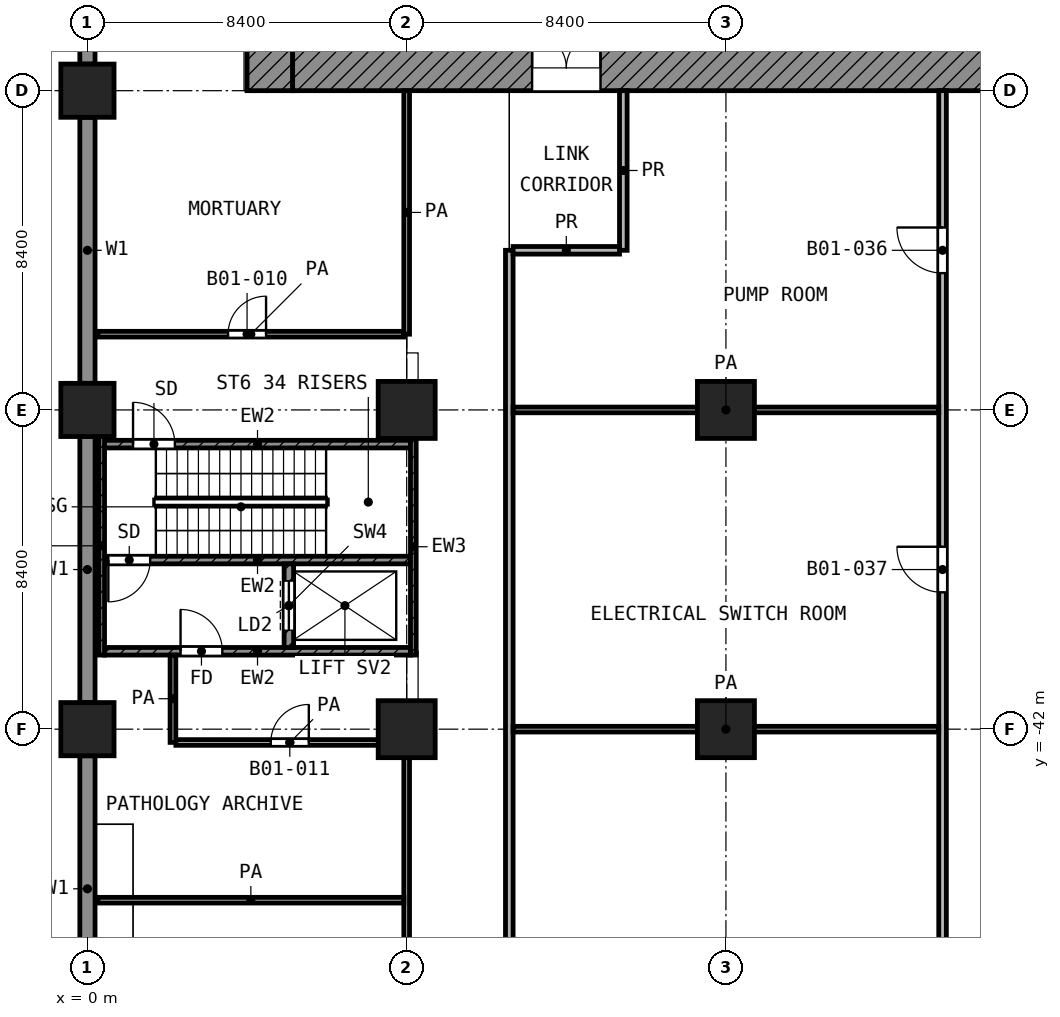
"""IFC4 building model, lengths in metres.
Left out: names, types, materials, properties, quantities, classifications, styles, units other than length and angle.
Written with IfcOpenShell. Run it as: python <this file> out.ifc"""

import sys

from ifc_helpers import new_model, si_unit, direction, frame, frame_2d, origin, origin_2d, place, context, subcontext, project, spatial, polyline, rectangle, outline, extrude, element, fill, save


model = new_model("IFC4")
c1 = context("Model", 3, precision=1e-05, world=origin(), true_north=direction((0.0, 1.0)))
c2 = subcontext(c1, "Body", "Model", "MODEL_VIEW")
j1 = project(units=[si_unit("LENGTHUNIT", "METRE"), si_unit("PLANEANGLEUNIT", "RADIAN")], contexts=[c1])
p1 = place(None, origin())
s1 = spatial("IfcSite", under=j1, at=p1, CompositionType="ELEMENT")
p2 = place(p1, origin())
s2 = spatial("IfcBuilding", under=s1, at=p2, CompositionType="ELEMENT")
p3 = place(p2, frame((0.0, 0.0, -6.0)))
s3 = spatial("IfcBuildingStorey", under=s2, at=p3, CompositionType="ELEMENT", Elevation=-6.0)
p4 = place(p3, origin())
e1 = element("IfcWall", 1, at=p4, inside=s3, PredefinedType="SOLIDWALL", context=c2, shape_type="SweptSolid", body=[
    extrude(outline(polyline([(0.2, -17.5), (0.2, -24.5), (-0.2, -24.5), (-0.2, -17.5), (0.2, -17.5)])), origin(), (0.0, 0.0, 1.0), 5.55),
])
e2 = element("IfcWall", 2, at=p4, inside=s3, PredefinedType="SOLIDWALL", context=c2, shape_type="SweptSolid", body=[
    extrude(outline(polyline([(0.2, -25.9), (0.2, -32.9), (-0.2, -32.9), (-0.2, -25.9), (0.2, -25.9)])), origin(), (0.0, 0.0, 1.0), 5.55),
])
e3 = element("IfcWall", 3, at=p4, inside=s3, PredefinedType="SOLIDWALL", context=c2, shape_type="SweptSolid", body=[
    extrude(outline(polyline([(0.2, -34.3), (0.2, -41.3), (-0.2, -41.3), (-0.2, -34.3), (0.2, -34.3)])), origin(), (0.0, 0.0, 1.0), 5.55),
])
e4 = element("IfcWall", 4, at=p4, inside=s3, PredefinedType="SOLIDWALL", context=c2, shape_type="SweptSolid", body=[
    extrude(outline(polyline([(0.2, -42.7), (0.2, -49.7), (-0.2, -49.7), (-0.2, -42.7), (0.2, -42.7)])), origin(), (0.0, 0.0, 1.0), 5.55),
])
for number, where, z_axis, x_axis in (
    (5, (0.0, -25.2, 0.0), (0.0, 0.0, 1.0), (1.0, 0.0, 0.0)),
    (6, (0.0, -33.6, 0.0), (0.0, 0.0, 1.0), (1.0, 0.0, 0.0)),
):
    element("IfcColumn", number, at=place(p3, frame(where, z_axis=z_axis, x_axis=x_axis)), inside=s3, PredefinedType="COLUMN", context=c2, shape_type="SweptSolid", body=[
        extrude(rectangle(XDim=1.4, YDim=1.4, at=origin_2d()), origin(), (0.0, 0.0, 1.0), 6.0),
    ])
for number, where, z_axis, x_axis in (
    (7, (8.4, -33.6, 0.0), (0.0, 0.0, 1.0), (1.0, 0.0, 0.0)),
    (8, (16.8, -33.6, 0.0), (0.0, 0.0, 1.0), (1.0, 0.0, 0.0)),
):
    element("IfcColumn", number, at=place(p3, frame(where, z_axis=z_axis, x_axis=x_axis)), inside=s3, PredefinedType="COLUMN", context=c2, shape_type="SweptSolid", body=[
        extrude(rectangle(XDim=1.5, YDim=1.5, at=origin_2d()), origin(), (0.0, 0.0, 1.0), 6.0),
    ])
p5 = place(p3, frame((0.0, -42.0, 0.0), z_axis=(0.0, 0.0, 1.0), x_axis=(1.0, 0.0, 0.0)))
e9 = element("IfcColumn", 9, at=p5, inside=s3, PredefinedType="COLUMN", context=c2, shape_type="SweptSolid", body=[
    extrude(rectangle(XDim=1.4, YDim=1.4, at=origin_2d()), origin(), (0.0, 0.0, 1.0), 6.0),
])
for number, where, z_axis, x_axis in (
    (10, (8.4, -42.0, 0.0), (0.0, 0.0, 1.0), (1.0, 0.0, 0.0)),
    (11, (16.8, -42.0, 0.0), (0.0, 0.0, 1.0), (1.0, 0.0, 0.0)),
):
    element("IfcColumn", number, at=place(p3, frame(where, z_axis=z_axis, x_axis=x_axis)), inside=s3, PredefinedType="COLUMN", context=c2, shape_type="SweptSolid", body=[
        extrude(rectangle(XDim=1.5, YDim=1.5, at=origin_2d()), origin(), (0.0, 0.0, 1.0), 6.0),
    ])
p6 = place(p3, frame((4.8, -25.2, 0.0), z_axis=(0.0, 0.0, 1.0), x_axis=(0.0, 1.0, 0.0)))
e12 = element("IfcWall", 12, at=p6, inside=s3, PredefinedType="SHEAR", context=c2, shape_type="SweptSolid", body=[
    extrude(rectangle(XDim=19.8, YDim=1.2, at=frame_2d((9.9, 0.0))), origin(), (0.0, 0.0, 1.0), 5.55),
])
p7 = place(p6, frame((11.65, 0.0, 0.0)))
e13 = element("IfcOpeningElement", 13, at=p7, cuts=e12, PredefinedType="OPENING", context=c2, shape_type="SweptSolid", body=[
    extrude(rectangle(XDim=1.1, YDim=2.1, at=frame_2d((0.55, 1.05))), frame((0.0, 0.61, 0.0), z_axis=(0.0, -1.0, 0.0), x_axis=(1.0, 0.0, 0.0)), (0.0, 0.0, 1.0), 1.22),
])
p8 = place(p6, frame((2.35, 0.0, 0.0)))
e14 = element("IfcOpeningElement", 14, at=p8, cuts=e12, PredefinedType="OPENING", context=c2, shape_type="SweptSolid", body=[
    extrude(rectangle(XDim=1.1, YDim=2.1, at=frame_2d((0.55, 1.05))), frame((0.0, 0.61, 0.0), z_axis=(0.0, -1.0, 0.0), x_axis=(1.0, 0.0, 0.0)), (0.0, 0.0, 1.0), 1.22),
])
p9 = place(p3, frame((5.4, -24.6, 0.0), z_axis=(0.0, 0.0, 1.0), x_axis=(1.0, 0.0, 0.0)))
e15 = element("IfcWall", 15, at=p9, inside=s3, PredefinedType="SHEAR", context=c2, shape_type="SweptSolid", body=[
    extrude(rectangle(XDim=18.6, YDim=1.2, at=frame_2d((9.3, 0.0))), origin(), (0.0, 0.0, 1.0), 5.55),
])
p10 = place(p9, frame((6.3, 0.0, 0.0)))
e16 = element("IfcOpeningElement", 16, at=p10, cuts=e15, PredefinedType="OPENING", context=c2, shape_type="SweptSolid", body=[
    extrude(rectangle(XDim=1.8, YDim=2.1, at=frame_2d((0.9, 1.05))), frame((0.0, 0.61, 0.0), z_axis=(0.0, -1.0, 0.0), x_axis=(1.0, 0.0, 0.0)), (0.0, 0.0, 1.0), 1.22),
])
p11 = place(p3, frame((0.375, -40.05, 0.0), z_axis=(0.0, 0.0, 1.0), x_axis=(0.0, 1.0, 0.0)))
e17 = element("IfcWall", 17, at=p11, inside=s3, PredefinedType="SHEAR", context=c2, shape_type="SweptSolid", body=[
    extrude(rectangle(XDim=5.75, YDim=0.15, at=frame_2d((2.875, 0.0))), origin(), (0.0, 0.0, 1.0), 5.55),
])
p12 = place(p3, frame((8.575, -40.05, 0.0), z_axis=(0.0, 0.0, 1.0), x_axis=(0.0, 1.0, 0.0)))
e18 = element("IfcWall", 18, at=p12, inside=s3, PredefinedType="SHEAR", context=c2, shape_type="SweptSolid", body=[
    extrude(rectangle(XDim=5.7, YDim=0.15, at=frame_2d((2.85, 0.0))), origin(), (0.0, 0.0, 1.0), 5.55),
])
p13 = place(p3, frame((0.45, -34.5, 0.0), z_axis=(0.0, 0.0, 1.0), x_axis=(1.0, 0.0, 0.0)))
e19 = element("IfcWall", 19, at=p13, inside=s3, PredefinedType="SHEAR", context=c2, shape_type="SweptSolid", body=[
    extrude(rectangle(XDim=8.05, YDim=0.2, at=frame_2d((4.025, 0.0))), origin(), (0.0, 0.0, 1.0), 5.55),
])
p14 = place(p13, frame((0.75, 0.0, 0.0)))
e20 = element("IfcOpeningElement", 20, at=p14, cuts=e19, PredefinedType="OPENING", context=c2, shape_type="SweptSolid", body=[
    extrude(rectangle(XDim=1.1, YDim=2.1, at=frame_2d((0.55, 1.05))), frame((0.0, 0.11, 0.0), z_axis=(0.0, -1.0, 0.0), x_axis=(1.0, 0.0, 0.0)), (0.0, 0.0, 1.0), 0.22),
])
p15 = place(p3, frame((0.45, -37.55, 0.0), z_axis=(0.0, 0.0, 1.0), x_axis=(1.0, 0.0, 0.0)))
e21 = element("IfcWall", 21, at=p15, inside=s3, PredefinedType="SHEAR", context=c2, shape_type="SweptSolid", body=[
    extrude(rectangle(XDim=8.05, YDim=0.2, at=frame_2d((4.025, 0.0))), origin(), (0.0, 0.0, 1.0), 5.55),
])
p16 = place(p15, frame((0.1, 0.0, 0.0)))
e22 = element("IfcOpeningElement", 22, at=p16, cuts=e21, PredefinedType="OPENING", context=c2, shape_type="SweptSolid", body=[
    extrude(rectangle(XDim=1.1, YDim=2.1, at=frame_2d((0.55, 1.05))), frame((0.0, 0.11, 0.0), z_axis=(0.0, -1.0, 0.0), x_axis=(1.0, 0.0, 0.0)), (0.0, 0.0, 1.0), 0.22),
])
p17 = place(p3, frame((0.45, -39.95, 0.0), z_axis=(0.0, 0.0, 1.0), x_axis=(1.0, 0.0, 0.0)))
e23 = element("IfcWall", 23, at=p17, inside=s3, PredefinedType="SHEAR", context=c2, shape_type="SweptSolid", body=[
    extrude(rectangle(XDim=8.05, YDim=0.2, at=frame_2d((4.025, 0.0))), origin(), (0.0, 0.0, 1.0), 5.55),
])
p18 = place(p17, frame((2.0, 0.0, 0.0)))
e24 = element("IfcOpeningElement", 24, at=p18, cuts=e23, PredefinedType="OPENING", context=c2, shape_type="SweptSolid", body=[
    extrude(rectangle(XDim=1.1, YDim=2.1, at=frame_2d((0.55, 1.05))), frame((0.0, 0.11, 0.0), z_axis=(0.0, -1.0, 0.0), x_axis=(1.0, 0.0, 0.0)), (0.0, 0.0, 1.0), 0.22),
])
p19 = place(p3, frame((5.3, -39.85, 0.0), z_axis=(0.0, 0.0, 1.0), x_axis=(0.0, 1.0, 0.0)))
e25 = element("IfcWall", 25, at=p19, inside=s3, PredefinedType="SHEAR", context=c2, shape_type="SweptSolid", body=[
    extrude(rectangle(XDim=2.2, YDim=0.25, at=frame_2d((1.1, 0.0))), origin(), (0.0, 0.0, 1.0), 5.55),
])
p20 = place(p19, frame((0.45, 0.0, 0.0)))
e26 = element("IfcOpeningElement", 26, at=p20, cuts=e25, PredefinedType="OPENING", context=c2, shape_type="SweptSolid", body=[
    extrude(rectangle(XDim=1.3, YDim=2.1, at=frame_2d((0.65, 1.05))), frame((0.0, 0.135, 0.0), z_axis=(0.0, -1.0, 0.0), x_axis=(1.0, 0.0, 0.0)), (0.0, 0.0, 1.0), 0.27),
])
p21 = place(p3, frame((0.274, -46.5, 0.0), z_axis=(0.0, 0.0, 1.0), x_axis=(1.0, 0.0, 0.0)))
e27 = element("IfcWall", 27, at=p21, inside=s3, PredefinedType="PARTITIONING", context=c2, shape_type="SweptSolid", body=[
    extrude(rectangle(XDim=8.051, YDim=0.15, at=frame_2d((4.025, 0.0))), origin(), (0.0, 0.0, 1.0), 5.55),
])
p22 = place(p3, frame((2.326, -42.35, 0.0), z_axis=(0.0, 0.0, 1.0), x_axis=(1.0, 0.0, 0.0)))
e28 = element("IfcWall", 28, at=p22, inside=s3, PredefinedType="PARTITIONING", context=c2, shape_type="SweptSolid", body=[
    extrude(rectangle(XDim=5.999, YDim=0.15, at=frame_2d((3.0, 0.0))), origin(), (0.0, 0.0, 1.0), 5.55),
])
p23 = place(p22, frame((2.499, 0.0, 0.0)))
e29 = element("IfcOpeningElement", 29, at=p23, cuts=e28, PredefinedType="OPENING", context=c2, shape_type="SweptSolid", body=[
    extrude(rectangle(XDim=1.0, YDim=2.1, at=frame_2d((0.5, 1.05))), frame((0.0, 0.085, 0.0), z_axis=(0.0, -1.0, 0.0), x_axis=(1.0, 0.0, 0.0)), (0.0, 0.0, 1.0), 0.17),
])
for number, where, z_axis, x_axis in (
    (30, (11.2, -42.0, 0.0), (0.0, 0.0, 1.0), (1.0, 0.0, 0.0)),
    (31, (11.2, -33.6, 0.0), (0.0, 0.0, 1.0), (1.0, 0.0, 0.0)),
):
    element("IfcWall", number, at=place(p3, frame(where, z_axis=z_axis, x_axis=x_axis)), inside=s3, PredefinedType="PARTITIONING", context=c2, shape_type="SweptSolid", body=[
        extrude(rectangle(XDim=11.2, YDim=0.15, at=frame_2d((5.6, 0.0))), origin(), (0.0, 0.0, 1.0), 5.55),
    ])
p24 = place(p3, frame((0.274, -31.607, 0.0), z_axis=(0.0, 0.0, 1.0), x_axis=(1.0, 0.0, 0.0)))
e32 = element("IfcWall", 32, at=p24, inside=s3, PredefinedType="PARTITIONING", context=c2, shape_type="SweptSolid", body=[
    extrude(rectangle(XDim=8.051, YDim=0.15, at=frame_2d((4.025, 0.0))), origin(), (0.0, 0.0, 1.0), 5.55),
])
p25 = place(p24, frame((3.426, 0.0, 0.0)))
e33 = element("IfcOpeningElement", 33, at=p25, cuts=e32, PredefinedType="OPENING", context=c2, shape_type="SweptSolid", body=[
    extrude(rectangle(XDim=1.0, YDim=2.1, at=frame_2d((0.5, 1.05))), frame((0.0, 0.085, 0.0), z_axis=(0.0, -1.0, 0.0), x_axis=(1.0, 0.0, 0.0)), (0.0, 0.0, 1.0), 0.17),
])
p26 = place(p3, frame((2.25, -42.348, 0.0), z_axis=(0.0, 0.0, 1.0), x_axis=(0.0, 1.0, 0.0)))
e34 = element("IfcWall", 34, at=p26, inside=s3, PredefinedType="PARTITIONING", context=c2, shape_type="SweptSolid", body=[
    extrude(rectangle(XDim=2.298, YDim=0.15, at=frame_2d((1.149, 0.0))), origin(), (0.0, 0.0, 1.0), 5.55),
])
p27 = place(p3, frame((8.4, -83.726, 0.0), z_axis=(0.0, 0.0, 1.0), x_axis=(0.0, 1.0, 0.0)))
e35 = element("IfcWall", 35, at=p27, inside=s3, PredefinedType="PARTITIONING", context=c2, shape_type="SweptSolid", body=[
    extrude(rectangle(XDim=41.376, YDim=0.15, at=frame_2d((20.688, 0.0))), origin(), (0.0, 0.0, 1.0), 5.55),
])
p28 = place(p27, frame((34.176, 0.0, 0.0)))
e36 = element("IfcOpeningElement", 36, at=p28, cuts=e35, PredefinedType="OPENING", context=c2, shape_type="SweptSolid", body=[
    extrude(rectangle(XDim=1.0, YDim=2.1, at=frame_2d((0.5, 1.05))), frame((0.0, 0.085, 0.0), z_axis=(0.0, -1.0, 0.0), x_axis=(1.0, 0.0, 0.0)), (0.0, 0.0, 1.0), 0.17),
])
p29 = place(p27, frame((25.726, 0.0, 0.0)))
e37 = element("IfcOpeningElement", 37, at=p29, cuts=e35, PredefinedType="OPENING", context=c2, shape_type="SweptSolid", body=[
    extrude(rectangle(XDim=1.0, YDim=2.1, at=frame_2d((0.5, 1.05))), frame((0.0, 0.085, 0.0), z_axis=(0.0, -1.0, 0.0), x_axis=(1.0, 0.0, 0.0)), (0.0, 0.0, 1.0), 0.17),
])
p30 = place(p27, frame((14.726, 0.0, 0.0)))
e38 = element("IfcOpeningElement", 38, at=p30, cuts=e35, PredefinedType="OPENING", context=c2, shape_type="SweptSolid", body=[
    extrude(rectangle(XDim=1.0, YDim=2.1, at=frame_2d((0.5, 1.05))), frame((0.0, 0.085, 0.0), z_axis=(0.0, -1.0, 0.0), x_axis=(1.0, 0.0, 0.0)), (0.0, 0.0, 1.0), 0.17),
])
p31 = place(p27, frame((6.276, 0.0, 0.0)))
e39 = element("IfcOpeningElement", 39, at=p31, cuts=e35, PredefinedType="OPENING", context=c2, shape_type="SweptSolid", body=[
    extrude(rectangle(XDim=1.0, YDim=2.1, at=frame_2d((0.5, 1.05))), frame((0.0, 0.085, 0.0), z_axis=(0.0, -1.0, 0.0), x_axis=(1.0, 0.0, 0.0)), (0.0, 0.0, 1.0), 0.17),
])
p32 = place(p27, frame((1.476, 0.0, 0.0)))
e40 = element("IfcOpeningElement", 40, at=p32, cuts=e35, PredefinedType="OPENING", context=c2, shape_type="SweptSolid", body=[
    extrude(rectangle(XDim=1.0, YDim=2.1, at=frame_2d((0.5, 1.05))), frame((0.0, 0.085, 0.0), z_axis=(0.0, -1.0, 0.0), x_axis=(1.0, 0.0, 0.0)), (0.0, 0.0, 1.0), 0.17),
])
p33 = place(p3, frame((8.4, -31.607, 0.0), z_axis=(0.0, 0.0, 1.0), x_axis=(0.0, 1.0, 0.0)))
e41 = element("IfcWall", 41, at=p33, inside=s3, PredefinedType="PARTITIONING", context=c2, shape_type="SweptSolid", body=[
    extrude(rectangle(XDim=6.407, YDim=0.15, at=frame_2d((3.204, 0.0))), origin(), (0.0, 0.0, 1.0), 5.55),
])
p34 = place(p3, frame((11.2, -29.4, 0.0), z_axis=(0.0, 0.0, 1.0), x_axis=(1.0, 0.0, 0.0)))
e42 = element("IfcWall", 42, at=p34, inside=s3, PredefinedType="PARTITIONING", context=c2, shape_type="SweptSolid", body=[
    extrude(rectangle(XDim=2.8, YDim=0.2, at=frame_2d((1.4, 0.0))), origin(), (0.0, 0.0, 1.0), 5.55),
])
p35 = place(p3, frame((11.1, -75.6, 0.0), z_axis=(0.0, 0.0, 1.0), x_axis=(0.0, 1.0, 0.0)))
e43 = element("IfcWall", 43, at=p35, inside=s3, PredefinedType="PARTITIONING", context=c2, shape_type="SweptSolid", body=[
    extrude(rectangle(XDim=46.2, YDim=0.2, at=frame_2d((23.1, 0.0))), origin(), (0.0, 0.0, 1.0), 5.55),
])
p36 = place(p35, frame((24.6, 0.0, 0.0)))
e44 = element("IfcOpeningElement", 44, at=p36, cuts=e43, PredefinedType="OPENING", context=c2, shape_type="SweptSolid", body=[
    extrude(rectangle(XDim=1.2, YDim=2.1, at=frame_2d((0.6, 1.05))), frame((0.0, 0.11, 0.0), z_axis=(0.0, -1.0, 0.0), x_axis=(1.0, 0.0, 0.0)), (0.0, 0.0, 1.0), 0.22),
])
p37 = place(p3, frame((14.1, -29.4, 0.0), z_axis=(0.0, 0.0, 1.0), x_axis=(0.0, 1.0, 0.0)))
e45 = element("IfcWall", 45, at=p37, inside=s3, PredefinedType="PARTITIONING", context=c2, shape_type="SweptSolid", body=[
    extrude(rectangle(XDim=4.2, YDim=0.2, at=frame_2d((2.1, 0.0))), origin(), (0.0, 0.0, 1.0), 5.55),
])
p38 = place(p3, frame((22.5, -75.6, 0.0), z_axis=(0.0, 0.0, 1.0), x_axis=(0.0, 1.0, 0.0)))
e46 = element("IfcWall", 46, at=p38, inside=s3, PredefinedType="PARTITIONING", context=c2, shape_type="SweptSolid", body=[
    extrude(rectangle(XDim=50.4, YDim=0.2, at=frame_2d((25.2, 0.0))), origin(), (0.0, 0.0, 1.0), 5.55),
])
p39 = place(p38, frame((45.6, 0.0, 0.0)))
e47 = element("IfcOpeningElement", 47, at=p39, cuts=e46, PredefinedType="OPENING", context=c2, shape_type="SweptSolid", body=[
    extrude(rectangle(XDim=1.2, YDim=2.1, at=frame_2d((0.6, 1.05))), frame((0.0, 0.11, 0.0), z_axis=(0.0, -1.0, 0.0), x_axis=(1.0, 0.0, 0.0)), (0.0, 0.0, 1.0), 0.22),
])
p40 = place(p38, frame((37.2, 0.0, 0.0)))
e48 = element("IfcOpeningElement", 48, at=p40, cuts=e46, PredefinedType="OPENING", context=c2, shape_type="SweptSolid", body=[
    extrude(rectangle(XDim=1.2, YDim=2.1, at=frame_2d((0.6, 1.05))), frame((0.0, 0.11, 0.0), z_axis=(0.0, -1.0, 0.0), x_axis=(1.0, 0.0, 0.0)), (0.0, 0.0, 1.0), 0.22),
])
p41 = place(p38, frame((7.8, 0.0, 0.0)))
e49 = element("IfcOpeningElement", 49, at=p41, cuts=e46, PredefinedType="OPENING", context=c2, shape_type="SweptSolid", body=[
    extrude(rectangle(XDim=1.2, YDim=2.1, at=frame_2d((0.6, 1.05))), frame((0.0, 0.11, 0.0), z_axis=(0.0, -1.0, 0.0), x_axis=(1.0, 0.0, 0.0)), (0.0, 0.0, 1.0), 0.22),
])
p42 = place(p10, origin())
e50 = element("IfcDoor", 50, at=p42, inside=s3, OperationType="DOUBLE_DOOR_SINGLE_SWING", PredefinedType="DOOR", context=c2, shape_type="SweptSolid", body=[
    extrude(rectangle(XDim=1.8, YDim=2.1, at=frame_2d((0.9, 1.05))), frame((0.0, 0.025, 0.0), z_axis=(0.0, -1.0, 0.0), x_axis=(1.0, 0.0, 0.0)), (0.0, 0.0, 1.0), 0.05),
])
fill(e16, e50)
p43 = place(p14, origin())
e51 = element("IfcDoor", 51, at=p43, inside=s3, OperationType="SINGLE_SWING_LEFT", PredefinedType="DOOR", context=c2, shape_type="SweptSolid", body=[
    extrude(rectangle(XDim=1.1, YDim=2.1, at=frame_2d((0.55, 1.05))), frame((0.0, 0.025, 0.0), z_axis=(0.0, -1.0, 0.0), x_axis=(1.0, 0.0, 0.0)), (0.0, 0.0, 1.0), 0.05),
])
fill(e20, e51)
p44 = place(p16, frame((1.1, 0.0, 0.0), z_axis=(0.0, 0.0, 1.0), x_axis=(-1.0, 0.0, 0.0)))
e52 = element("IfcDoor", 52, at=p44, inside=s3, OperationType="SINGLE_SWING_LEFT", PredefinedType="DOOR", context=c2, shape_type="SweptSolid", body=[
    extrude(rectangle(XDim=1.1, YDim=2.1, at=frame_2d((0.55, 1.05))), frame((0.0, 0.025, 0.0), z_axis=(0.0, -1.0, 0.0), x_axis=(1.0, 0.0, 0.0)), (0.0, 0.0, 1.0), 0.05),
])
fill(e22, e52)
p45 = place(p20, origin())
e53 = element("IfcDoor", 53, at=p45, inside=s3, OperationType="DOUBLE_DOOR_SLIDING", PredefinedType="DOOR", context=c2, shape_type="SweptSolid", body=[
    extrude(rectangle(XDim=1.3, YDim=2.1, at=frame_2d((0.65, 1.05))), frame((0.0, 0.025, 0.0), z_axis=(0.0, -1.0, 0.0), x_axis=(1.0, 0.0, 0.0)), (0.0, 0.0, 1.0), 0.05),
])
fill(e26, e53)
p46 = place(p18, origin())
e54 = element("IfcDoor", 54, at=p46, inside=s3, OperationType="SINGLE_SWING_LEFT", PredefinedType="DOOR", context=c2, shape_type="SweptSolid", body=[
    extrude(rectangle(XDim=1.1, YDim=2.1, at=frame_2d((0.55, 1.05))), frame((0.0, 0.025, 0.0), z_axis=(0.0, -1.0, 0.0), x_axis=(1.0, 0.0, 0.0)), (0.0, 0.0, 1.0), 0.05),
])
fill(e24, e54)
p47 = place(p25, origin())
e55 = element("IfcDoor", 55, at=p47, inside=s3, OperationType="SINGLE_SWING_RIGHT", PredefinedType="DOOR", context=c2, shape_type="SweptSolid", body=[
    extrude(rectangle(XDim=1.0, YDim=2.1, at=frame_2d((0.5, 1.05))), frame((0.0, 0.025, 0.0), z_axis=(0.0, -1.0, 0.0), x_axis=(1.0, 0.0, 0.0)), (0.0, 0.0, 1.0), 0.05),
])
fill(e33, e55)
p48 = place(p23, origin())
e56 = element("IfcDoor", 56, at=p48, inside=s3, OperationType="SINGLE_SWING_RIGHT", PredefinedType="DOOR", context=c2, shape_type="SweptSolid", body=[
    extrude(rectangle(XDim=1.0, YDim=2.1, at=frame_2d((0.5, 1.05))), frame((0.0, 0.025, 0.0), z_axis=(0.0, -1.0, 0.0), x_axis=(1.0, 0.0, 0.0)), (0.0, 0.0, 1.0), 0.05),
])
fill(e29, e56)
p49 = place(p39, origin())
e57 = element("IfcDoor", 57, at=p49, inside=s3, OperationType="SINGLE_SWING_RIGHT", PredefinedType="DOOR", context=c2, shape_type="SweptSolid", body=[
    extrude(rectangle(XDim=1.2, YDim=2.1, at=frame_2d((0.6, 1.05))), frame((0.0, 0.025, 0.0), z_axis=(0.0, -1.0, 0.0), x_axis=(1.0, 0.0, 0.0)), (0.0, 0.0, 1.0), 0.05),
])
fill(e47, e57)
p50 = place(p40, origin())
e58 = element("IfcDoor", 58, at=p50, inside=s3, OperationType="SINGLE_SWING_RIGHT", PredefinedType="DOOR", context=c2, shape_type="SweptSolid", body=[
    extrude(rectangle(XDim=1.2, YDim=2.1, at=frame_2d((0.6, 1.05))), frame((0.0, 0.025, 0.0), z_axis=(0.0, -1.0, 0.0), x_axis=(1.0, 0.0, 0.0)), (0.0, 0.0, 1.0), 0.05),
])
fill(e48, e58)
save(model, sys.argv[1])
